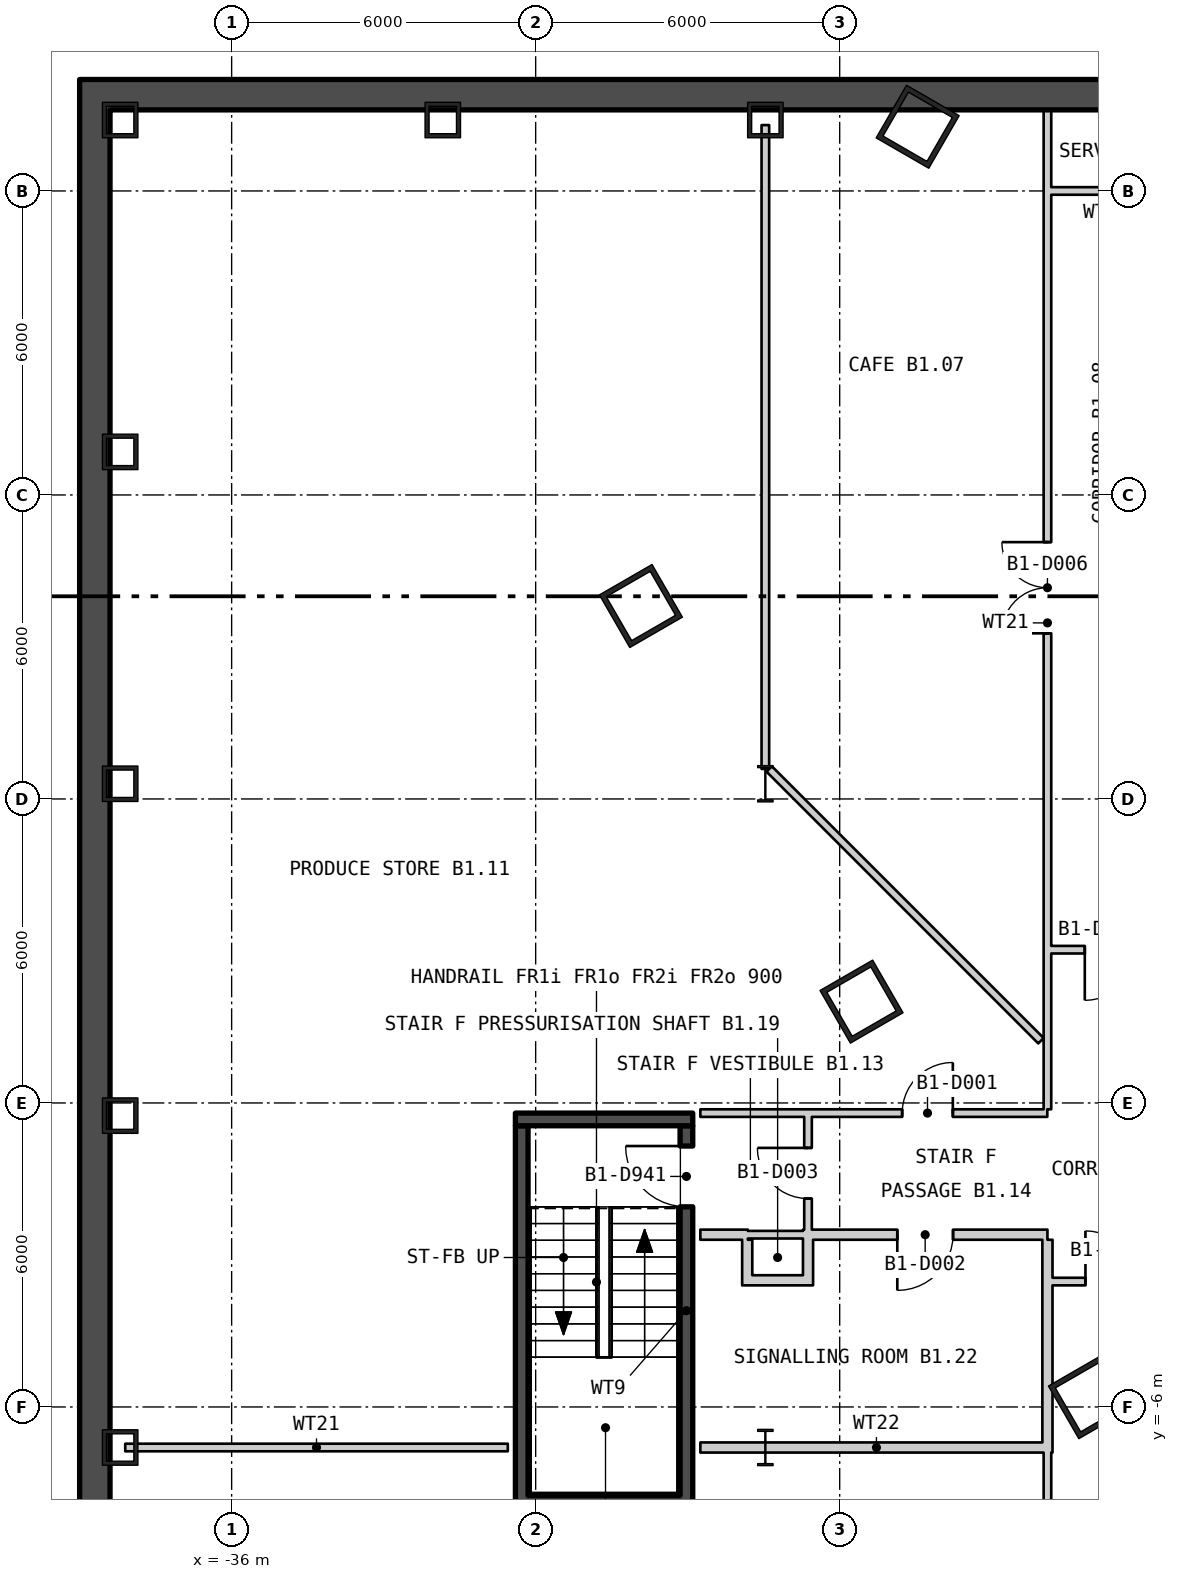
"""IFC4 building model, lengths in metres.
Left out: names, types, materials, properties, quantities, classifications, styles, units other than length and angle.
Written with IfcOpenShell. Run it as: python <this file> out.ifc"""

import sys

from ifc_helpers import new_model, si_unit, direction, frame, frame_2d, origin, origin_2d, place, context, subcontext, project, spatial, rectangle, hollow_rectangle, i_section, extrude, element, fill, save


model = new_model("IFC4")
c1 = context("Model", 3, precision=1e-05, world=origin(), true_north=direction((0.0, 1.0)))
c2 = subcontext(c1, "Body", "Model", "MODEL_VIEW")
j1 = project(units=[si_unit("LENGTHUNIT", "METRE"), si_unit("PLANEANGLEUNIT", "RADIAN")], contexts=[c1])
p1 = place(None, origin())
s1 = spatial("IfcSite", under=j1, at=p1, CompositionType="ELEMENT")
p2 = place(p1, origin())
s2 = spatial("IfcBuilding", under=s1, at=p2, CompositionType="ELEMENT")
p3 = place(p2, frame((0.0, 0.0, -5.7)))
s3 = spatial("IfcBuildingStorey", under=s2, at=p3, CompositionType="ELEMENT", Elevation=-5.7)
for number, where, z_axis, x_axis in (
    (1, (-22.461, 19.267, 0.0), (0.0, 0.0, 1.0), (-0.5, -0.866, 0.0)),
    (2, (-27.923, 9.808, 0.0), (0.0, 0.0, 1.0), (0.5, -0.866, 0.0)),
    (3, (-23.569, 2.0, 0.0), (0.0, 0.0, 1.0), (0.5, -0.866, 0.0)),
    (4, (-19.061, -5.807, 0.0), (0.0, 0.0, 1.0), (0.5, -0.866, 0.0)),
):
    element("IfcColumn", number, at=place(p3, frame(where, z_axis=z_axis, x_axis=x_axis)), inside=s3, PredefinedType="COLUMN", context=c2, shape_type="SweptSolid", body=[
        extrude(hollow_rectangle(XDim=1.2, YDim=1.2, WallThickness=0.1, at=origin_2d()), origin(), (0.0, 0.0, 1.0), 5.7),
    ])
for number, where, z_axis, x_axis in (
    (5, (-25.467, 19.4, 0.0), (0.0, 0.0, 1.0), (-1.0, 0.0, 0.0)),
    (6, (-31.833, 19.4, 0.0), (0.0, 0.0, 1.0), (-1.0, 0.0, 0.0)),
    (7, (-38.2, 19.4, 0.0), (0.0, 0.0, 1.0), (0.0, -1.0, 0.0)),
    (8, (-38.2, 12.85, 0.0), (0.0, 0.0, 1.0), (0.0, -1.0, 0.0)),
    (9, (-38.2, 6.3, 0.0), (0.0, 0.0, 1.0), (0.0, -1.0, 0.0)),
    (10, (-38.2, -0.25, 0.0), (0.0, 0.0, 1.0), (0.0, -1.0, 0.0)),
    (11, (-38.2, -6.8, 0.0), (0.0, 0.0, 1.0), (0.0, -1.0, 0.0)),
):
    element("IfcColumn", number, at=place(p3, frame(where, z_axis=z_axis, x_axis=x_axis)), inside=s3, PredefinedType="COLUMN", context=c2, shape_type="SweptSolid", body=[
        extrude(hollow_rectangle(XDim=0.7, YDim=0.7, WallThickness=0.08, at=origin_2d()), origin(), (0.0, 0.0, 1.0), 5.7),
    ])
p4 = place(p3, frame((-25.467, 6.3, 0.0), z_axis=(0.0, 0.0, 1.0), x_axis=(1.0, 0.0, 0.0)))
e12 = element("IfcColumn", 12, at=p4, inside=s3, PredefinedType="COLUMN", context=c2, shape_type="SweptSolid", body=[
    extrude(i_section(OverallWidth=0.304, OverallDepth=0.716, WebThickness=0.021, FlangeThickness=0.04, at=origin_2d()), origin(), (0.0, 0.0, 1.0), 5.25),
])
p5 = place(p3, frame((-25.467, -6.8, 0.0), z_axis=(0.0, 0.0, 1.0), x_axis=(1.0, 0.0, 0.0)))
e13 = element("IfcColumn", 13, at=p5, inside=s3, PredefinedType="COLUMN", context=c2, shape_type="SweptSolid", body=[
    extrude(i_section(OverallWidth=0.304, OverallDepth=0.716, WebThickness=0.021, FlangeThickness=0.04, at=origin_2d()), origin(), (0.0, 0.0, 1.0), 5.7),
])
p6 = place(p3, frame((-39.0, 19.9, -0.4), z_axis=(0.0, 0.0, 1.0), x_axis=(1.0, 0.0, 0.0)))
e14 = element("IfcWall", 14, at=p6, inside=s3, PredefinedType="STANDARD", context=c2, shape_type="SweptSolid", body=[
    extrude(rectangle(XDim=78.0, YDim=0.6, at=frame_2d((39.0, 0.0))), origin(), (0.0, 0.0, 1.0), 5.7),
])
p7 = place(p3, frame((-38.7, -33.2, -0.4), z_axis=(0.0, 0.0, 1.0), x_axis=(0.0, 1.0, 0.0)))
e15 = element("IfcWall", 15, at=p7, inside=s3, PredefinedType="STANDARD", context=c2, shape_type="SweptSolid", body=[
    extrude(rectangle(XDim=52.8, YDim=0.6, at=frame_2d((26.4, 0.0))), origin(), (0.0, 0.0, 1.0), 5.7),
])
p8 = place(p3, frame((-30.275, -7.75, 0.0), z_axis=(0.0, 0.0, 1.0), x_axis=(0.0, 1.0, 0.0)))
e16 = element("IfcWall", 16, at=p8, inside=s3, PredefinedType="SHEAR", context=c2, shape_type="SweptSolid", body=[
    extrude(rectangle(XDim=7.3, YDim=0.25, at=frame_2d((3.65, 0.0))), origin(), (0.0, 0.0, 1.0), 5.25),
])
p9 = place(p3, frame((-27.025, -7.75, 0.0), z_axis=(0.0, 0.0, 1.0), x_axis=(0.0, 1.0, 0.0)))
e17 = element("IfcWall", 17, at=p9, inside=s3, PredefinedType="SHEAR", context=c2, shape_type="SweptSolid", body=[
    extrude(rectangle(XDim=7.3, YDim=0.25, at=frame_2d((3.65, 0.0))), origin(), (0.0, 0.0, 1.0), 5.25),
])
p10 = place(p9, frame((5.7, 0.0, 0.0)))
e18 = element("IfcOpeningElement", 18, at=p10, cuts=e17, PredefinedType="OPENING", context=c2, shape_type="SweptSolid", body=[
    extrude(rectangle(XDim=1.2, YDim=2.1, at=frame_2d((0.6, 1.05))), frame((0.0, 0.135, 0.0), z_axis=(0.0, -1.0, 0.0), x_axis=(1.0, 0.0, 0.0)), (0.0, 0.0, 1.0), 0.27),
])
for number, where, z_axis, x_axis in (
    (19, (-30.4, -7.875, 0.0), (0.0, 0.0, 1.0), (1.0, 0.0, 0.0)),
    (20, (-30.4, -0.325, 0.0), (0.0, 0.0, 1.0), (1.0, 0.0, 0.0)),
):
    element("IfcWall", number, at=place(p3, frame(where, z_axis=z_axis, x_axis=x_axis)), inside=s3, PredefinedType="SHEAR", context=c2, shape_type="SweptSolid", body=[
        extrude(rectangle(XDim=3.5, YDim=0.25, at=frame_2d((1.75, 0.0))), origin(), (0.0, 0.0, 1.0), 5.25),
    ])
p11 = place(p3, frame((-38.1, -6.8, 0.0), z_axis=(0.0, 0.0, 1.0), x_axis=(1.0, 0.0, 0.0)))
e21 = element("IfcWall", 21, at=p11, inside=s3, PredefinedType="PARTITIONING", context=c2, shape_type="SweptSolid", body=[
    extrude(rectangle(XDim=7.55, YDim=0.15, at=frame_2d((3.775, 0.0))), origin(), (0.0, 0.0, 1.0), 5.25),
])
p12 = place(p3, frame((-26.75, -6.8, 0.0), z_axis=(0.0, 0.0, 1.0), x_axis=(1.0, 0.0, 0.0)))
e22 = element("IfcWall", 22, at=p12, inside=s3, PredefinedType="PARTITIONING", context=c2, shape_type="SweptSolid", body=[
    extrude(rectangle(XDim=6.95, YDim=0.2, at=frame_2d((3.475, 0.0))), origin(), (0.0, 0.0, 1.0), 5.25),
])
p13 = place(p3, frame((-26.75, -2.6, 0.0), z_axis=(0.0, 0.0, 1.0), x_axis=(1.0, 0.0, 0.0)))
e23 = element("IfcWall", 23, at=p13, inside=s3, PredefinedType="PARTITIONING", context=c2, shape_type="SweptSolid", body=[
    extrude(rectangle(XDim=0.937, YDim=0.2, at=frame_2d((0.469, 0.0))), origin(), (0.0, 0.0, 1.0), 5.25),
])
p14 = place(p3, frame((-26.75, -0.2, 0.0), z_axis=(0.0, 0.0, 1.0), x_axis=(1.0, 0.0, 0.0)))
e24 = element("IfcWall", 24, at=p14, inside=s3, PredefinedType="PARTITIONING", context=c2, shape_type="SweptSolid", body=[
    extrude(rectangle(XDim=6.847, YDim=0.15, at=frame_2d((3.424, 0.0))), origin(), (0.0, 0.0, 1.0), 5.25),
])
p15 = place(p14, frame((3.983, 0.0, 0.0)))
e25 = element("IfcOpeningElement", 25, at=p15, cuts=e24, PredefinedType="OPENING", context=c2, shape_type="SweptSolid", body=[
    extrude(rectangle(XDim=1.0, YDim=2.1, at=frame_2d((0.5, 1.05))), frame((0.0, 0.085, 0.0), z_axis=(0.0, -1.0, 0.0), x_axis=(1.0, 0.0, 0.0)), (0.0, 0.0, 1.0), 0.17),
])
p16 = place(p3, frame((-25.925, -3.5, 0.0), z_axis=(0.0, 0.0, 1.0), x_axis=(1.0, 0.0, 0.0)))
e26 = element("IfcWall", 26, at=p16, inside=s3, PredefinedType="PARTITIONING", context=c2, shape_type="SweptSolid", body=[
    extrude(rectangle(XDim=1.4, YDim=0.2, at=frame_2d((0.7, 0.0))), origin(), (0.0, 0.0, 1.0), 5.25),
])
p17 = place(p3, frame((-25.825, -3.4, 0.0), z_axis=(0.0, 0.0, 1.0), x_axis=(0.0, 1.0, 0.0)))
e27 = element("IfcWall", 27, at=p17, inside=s3, PredefinedType="PARTITIONING", context=c2, shape_type="SweptSolid", body=[
    extrude(rectangle(XDim=0.7, YDim=0.2, at=frame_2d((0.35, 0.0))), origin(), (0.0, 0.0, 1.0), 5.25),
])
p18 = place(p3, frame((-25.813, -2.6, 0.0), z_axis=(0.0, 0.0, 1.0), x_axis=(1.0, 0.0, 0.0)))
e28 = element("IfcWall", 28, at=p18, inside=s3, PredefinedType="PARTITIONING", context=c2, shape_type="SweptSolid", body=[
    extrude(rectangle(XDim=1.088, YDim=0.15, at=frame_2d((0.544, 0.0))), origin(), (0.0, 0.0, 1.0), 5.25),
])
p19 = place(p3, frame((-25.467, 6.592, 0.0), z_axis=(0.0, 0.0, 1.0), x_axis=(0.0, 1.0, 0.0)))
e29 = element("IfcWall", 29, at=p19, inside=s3, PredefinedType="PARTITIONING", context=c2, shape_type="SweptSolid", body=[
    extrude(rectangle(XDim=12.708, YDim=0.15, at=frame_2d((6.354, 0.0))), origin(), (0.0, 0.0, 1.0), 5.25),
])
p20 = place(p3, frame((-25.392, 6.592, 0.0), z_axis=(0.0, 0.0, 1.0), x_axis=(0.707106781187, -0.707106781187, 0.0)))
e30 = element("IfcWall", 30, at=p20, inside=s3, PredefinedType="PARTITIONING", context=c2, shape_type="SweptSolid", body=[
    extrude(rectangle(XDim=7.586, YDim=0.15, at=frame_2d((3.793, 0.0))), origin(), (0.0, 0.0, 1.0), 5.25),
])
p21 = place(p3, frame((-24.725, -2.6, 0.0), z_axis=(0.0, 0.0, 1.0), x_axis=(1.0, 0.0, 0.0)))
e31 = element("IfcWall", 31, at=p21, inside=s3, PredefinedType="PARTITIONING", context=c2, shape_type="SweptSolid", body=[
    extrude(rectangle(XDim=4.825, YDim=0.2, at=frame_2d((2.413, 0.0))), origin(), (0.0, 0.0, 1.0), 5.25),
])
p22 = place(p21, frame((1.862, 0.0, 0.0)))
e32 = element("IfcOpeningElement", 32, at=p22, cuts=e31, PredefinedType="OPENING", context=c2, shape_type="SweptSolid", body=[
    extrude(rectangle(XDim=1.1, YDim=2.1, at=frame_2d((0.55, 1.05))), frame((0.0, 0.11, 0.0), z_axis=(0.0, -1.0, 0.0), x_axis=(1.0, 0.0, 0.0)), (0.0, 0.0, 1.0), 0.22),
])
p23 = place(p3, frame((-24.625, -3.4, 0.0), z_axis=(0.0, 0.0, 1.0), x_axis=(0.0, 1.0, 0.0)))
e33 = element("IfcWall", 33, at=p23, inside=s3, PredefinedType="PARTITIONING", context=c2, shape_type="SweptSolid", body=[
    extrude(rectangle(XDim=0.7, YDim=0.2, at=frame_2d((0.35, 0.0))), origin(), (0.0, 0.0, 1.0), 5.25),
])
p24 = place(p3, frame((-24.625, -2.5, 0.0), z_axis=(0.0, 0.0, 1.0), x_axis=(0.0, 1.0, 0.0)))
e34 = element("IfcWall", 34, at=p24, inside=s3, PredefinedType="PARTITIONING", context=c2, shape_type="SweptSolid", body=[
    extrude(rectangle(XDim=2.225, YDim=0.15, at=frame_2d((1.113, 0.0))), origin(), (0.0, 0.0, 1.0), 5.25),
])
p25 = place(p24, frame((0.613, 0.0, 0.0)))
e35 = element("IfcOpeningElement", 35, at=p25, cuts=e34, PredefinedType="OPENING", context=c2, shape_type="SweptSolid", body=[
    extrude(rectangle(XDim=1.0, YDim=2.1, at=frame_2d((0.5, 1.05))), frame((0.0, 0.085, 0.0), z_axis=(0.0, -1.0, 0.0), x_axis=(1.0, 0.0, 0.0)), (0.0, 0.0, 1.0), 0.17),
])
p26 = place(p3, frame((-19.975, 18.0, 0.0), z_axis=(0.0, 0.0, 1.0), x_axis=(1.0, 0.0, 0.0)))
e36 = element("IfcWall", 36, at=p26, inside=s3, PredefinedType="PARTITIONING", context=c2, shape_type="SweptSolid", body=[
    extrude(rectangle(XDim=2.475, YDim=0.15, at=frame_2d((1.238, 0.0))), origin(), (0.0, 0.0, 1.0), 5.25),
])
p27 = place(p3, frame((-19.9, -23.775, 0.0), z_axis=(0.0, 0.0, 1.0), x_axis=(0.0, 1.0, 0.0)))
e37 = element("IfcWall", 37, at=p27, inside=s3, PredefinedType="PARTITIONING", context=c2, shape_type="SweptSolid", body=[
    extrude(rectangle(XDim=16.875, YDim=0.15, at=frame_2d((8.438, 0.0))), origin(), (0.0, 0.0, 1.0), 5.25),
])
p28 = place(p27, frame((2.993, 0.0, 0.0)))
e38 = element("IfcOpeningElement", 38, at=p28, cuts=e37, PredefinedType="OPENING", context=c2, shape_type="SweptSolid", body=[
    extrude(rectangle(XDim=1.0, YDim=2.1, at=frame_2d((0.5, 1.05))), frame((0.0, 0.085, 0.0), z_axis=(0.0, -1.0, 0.0), x_axis=(1.0, 0.0, 0.0)), (0.0, 0.0, 1.0), 0.17),
])
p29 = place(p27, frame((12.35, 0.0, 0.0)))
e39 = element("IfcOpeningElement", 39, at=p29, cuts=e37, PredefinedType="OPENING", context=c2, shape_type="SweptSolid", body=[
    extrude(rectangle(XDim=1.0, YDim=2.1, at=frame_2d((0.5, 1.05))), frame((0.0, 0.085, 0.0), z_axis=(0.0, -1.0, 0.0), x_axis=(1.0, 0.0, 0.0)), (0.0, 0.0, 1.0), 0.17),
])
p30 = place(p3, frame((-19.9, -6.7, 0.0), z_axis=(0.0, 0.0, 1.0), x_axis=(0.0, 1.0, 0.0)))
e40 = element("IfcWall", 40, at=p30, inside=s3, PredefinedType="PARTITIONING", context=c2, shape_type="SweptSolid", body=[
    extrude(rectangle(XDim=4.0, YDim=0.2, at=frame_2d((2.0, 0.0))), origin(), (0.0, 0.0, 1.0), 5.25),
])
p31 = place(p3, frame((-19.9, -0.125, 0.0), z_axis=(0.0, 0.0, 1.0), x_axis=(0.0, 1.0, 0.0)))
e41 = element("IfcWall", 41, at=p31, inside=s3, PredefinedType="PARTITIONING", context=c2, shape_type="SweptSolid", body=[
    extrude(rectangle(XDim=1.15, YDim=0.15, at=frame_2d((0.575, 0.0))), origin(), (0.0, 0.0, 1.0), 5.25),
])
p32 = place(p3, frame((-19.9, 1.025, 0.0), z_axis=(0.0, 0.0, 1.0), x_axis=(0.0, 1.0, 0.0)))
e42 = element("IfcWall", 42, at=p32, inside=s3, PredefinedType="PARTITIONING", context=c2, shape_type="SweptSolid", body=[
    extrude(rectangle(XDim=16.9, YDim=0.15, at=frame_2d((8.45, 0.0))), origin(), (0.0, 0.0, 1.0), 5.25),
])
p33 = place(p32, frame((8.244, 0.0, 0.0)))
e43 = element("IfcOpeningElement", 43, at=p33, cuts=e42, PredefinedType="OPENING", context=c2, shape_type="SweptSolid", body=[
    extrude(rectangle(XDim=1.8, YDim=2.1, at=frame_2d((0.9, 1.05))), frame((0.0, 0.085, 0.0), z_axis=(0.0, -1.0, 0.0), x_axis=(1.0, 0.0, 0.0)), (0.0, 0.0, 1.0), 0.17),
])
p34 = place(p3, frame((-19.9, 18.075, 0.0), z_axis=(0.0, 0.0, 1.0), x_axis=(0.0, 1.0, 0.0)))
e44 = element("IfcWall", 44, at=p34, inside=s3, PredefinedType="PARTITIONING", context=c2, shape_type="SweptSolid", body=[
    extrude(rectangle(XDim=1.675, YDim=0.15, at=frame_2d((0.838, 0.0))), origin(), (0.0, 0.0, 1.0), 5.25),
])
p35 = place(p3, frame((-19.825, 3.025, 0.0), z_axis=(0.0, 0.0, 1.0), x_axis=(1.0, 0.0, 0.0)))
e45 = element("IfcWall", 45, at=p35, inside=s3, PredefinedType="PARTITIONING", context=c2, shape_type="SweptSolid", body=[
    extrude(rectangle(XDim=2.325, YDim=0.15, at=frame_2d((1.163, 0.0))), origin(), (0.0, 0.0, 1.0), 5.25),
])
p36 = place(p35, frame((0.662, 0.0, 0.0)))
e46 = element("IfcOpeningElement", 46, at=p36, cuts=e45, PredefinedType="OPENING", context=c2, shape_type="SweptSolid", body=[
    extrude(rectangle(XDim=1.0, YDim=2.1, at=frame_2d((0.5, 1.05))), frame((0.0, 0.085, 0.0), z_axis=(0.0, -1.0, 0.0), x_axis=(1.0, 0.0, 0.0)), (0.0, 0.0, 1.0), 0.17),
])
p37 = place(p3, frame((-19.8, -3.525, 0.0), z_axis=(0.0, 0.0, 1.0), x_axis=(1.0, 0.0, 0.0)))
e47 = element("IfcWall", 47, at=p37, inside=s3, PredefinedType="PARTITIONING", context=c2, shape_type="SweptSolid", body=[
    extrude(rectangle(XDim=2.3, YDim=0.15, at=frame_2d((1.15, 0.0))), origin(), (0.0, 0.0, 1.0), 5.25),
])
p38 = place(p37, frame((0.65, 0.0, 0.0)))
e48 = element("IfcOpeningElement", 48, at=p38, cuts=e47, PredefinedType="OPENING", context=c2, shape_type="SweptSolid", body=[
    extrude(rectangle(XDim=1.0, YDim=2.1, at=frame_2d((0.5, 1.05))), frame((0.0, 0.085, 0.0), z_axis=(0.0, -1.0, 0.0), x_axis=(1.0, 0.0, 0.0)), (0.0, 0.0, 1.0), 0.17),
])
p39 = place(p10, origin())
e49 = element("IfcDoor", 49, at=p39, inside=s3, OperationType="SINGLE_SWING_LEFT", PredefinedType="DOOR", context=c2, shape_type="SweptSolid", body=[
    extrude(rectangle(XDim=1.2, YDim=2.1, at=frame_2d((0.6, 1.05))), frame((0.0, 0.025, 0.0), z_axis=(0.0, -1.0, 0.0), x_axis=(1.0, 0.0, 0.0)), (0.0, 0.0, 1.0), 0.05),
])
fill(e18, e49)
p40 = place(p15, origin())
e50 = element("IfcDoor", 50, at=p40, inside=s3, OperationType="SINGLE_SWING_LEFT", PredefinedType="DOOR", context=c2, shape_type="SweptSolid", body=[
    extrude(rectangle(XDim=1.0, YDim=2.1, at=frame_2d((0.5, 1.05))), frame((0.0, 0.025, 0.0), z_axis=(0.0, -1.0, 0.0), x_axis=(1.0, 0.0, 0.0)), (0.0, 0.0, 1.0), 0.05),
])
fill(e25, e50)
p41 = place(p22, origin())
e51 = element("IfcDoor", 51, at=p41, inside=s3, OperationType="SINGLE_SWING_LEFT", PredefinedType="DOOR", context=c2, shape_type="SweptSolid", body=[
    extrude(rectangle(XDim=1.1, YDim=2.1, at=frame_2d((0.55, 1.05))), frame((0.0, 0.025, 0.0), z_axis=(0.0, -1.0, 0.0), x_axis=(1.0, 0.0, 0.0)), (0.0, 0.0, 1.0), 0.05),
])
fill(e32, e51)
p42 = place(p25, origin())
e52 = element("IfcDoor", 52, at=p42, inside=s3, OperationType="SINGLE_SWING_LEFT", PredefinedType="DOOR", context=c2, shape_type="SweptSolid", body=[
    extrude(rectangle(XDim=1.0, YDim=2.1, at=frame_2d((0.5, 1.05))), frame((0.0, 0.025, 0.0), z_axis=(0.0, -1.0, 0.0), x_axis=(1.0, 0.0, 0.0)), (0.0, 0.0, 1.0), 0.05),
])
fill(e35, e52)
p43 = place(p33, origin())
e53 = element("IfcDoor", 53, at=p43, inside=s3, OperationType="DOUBLE_DOOR_SINGLE_SWING", PredefinedType="DOOR", context=c2, shape_type="SweptSolid", body=[
    extrude(rectangle(XDim=1.8, YDim=2.1, at=frame_2d((0.9, 1.05))), frame((0.0, 0.025, 0.0), z_axis=(0.0, -1.0, 0.0), x_axis=(1.0, 0.0, 0.0)), (0.0, 0.0, 1.0), 0.05),
])
fill(e43, e53)
p44 = place(p36, origin())
e54 = element("IfcDoor", 54, at=p44, inside=s3, OperationType="SINGLE_SWING_LEFT", PredefinedType="DOOR", context=c2, shape_type="SweptSolid", body=[
    extrude(rectangle(XDim=1.0, YDim=2.1, at=frame_2d((0.5, 1.05))), frame((0.0, 0.025, 0.0), z_axis=(0.0, -1.0, 0.0), x_axis=(1.0, 0.0, 0.0)), (0.0, 0.0, 1.0), 0.05),
])
fill(e46, e54)
p45 = place(p38, origin())
e55 = element("IfcDoor", 55, at=p45, inside=s3, OperationType="SINGLE_SWING_RIGHT", PredefinedType="DOOR", context=c2, shape_type="SweptSolid", body=[
    extrude(rectangle(XDim=1.0, YDim=2.1, at=frame_2d((0.5, 1.05))), frame((0.0, 0.025, 0.0), z_axis=(0.0, -1.0, 0.0), x_axis=(1.0, 0.0, 0.0)), (0.0, 0.0, 1.0), 0.05),
])
fill(e48, e55)
save(model, sys.argv[1])
